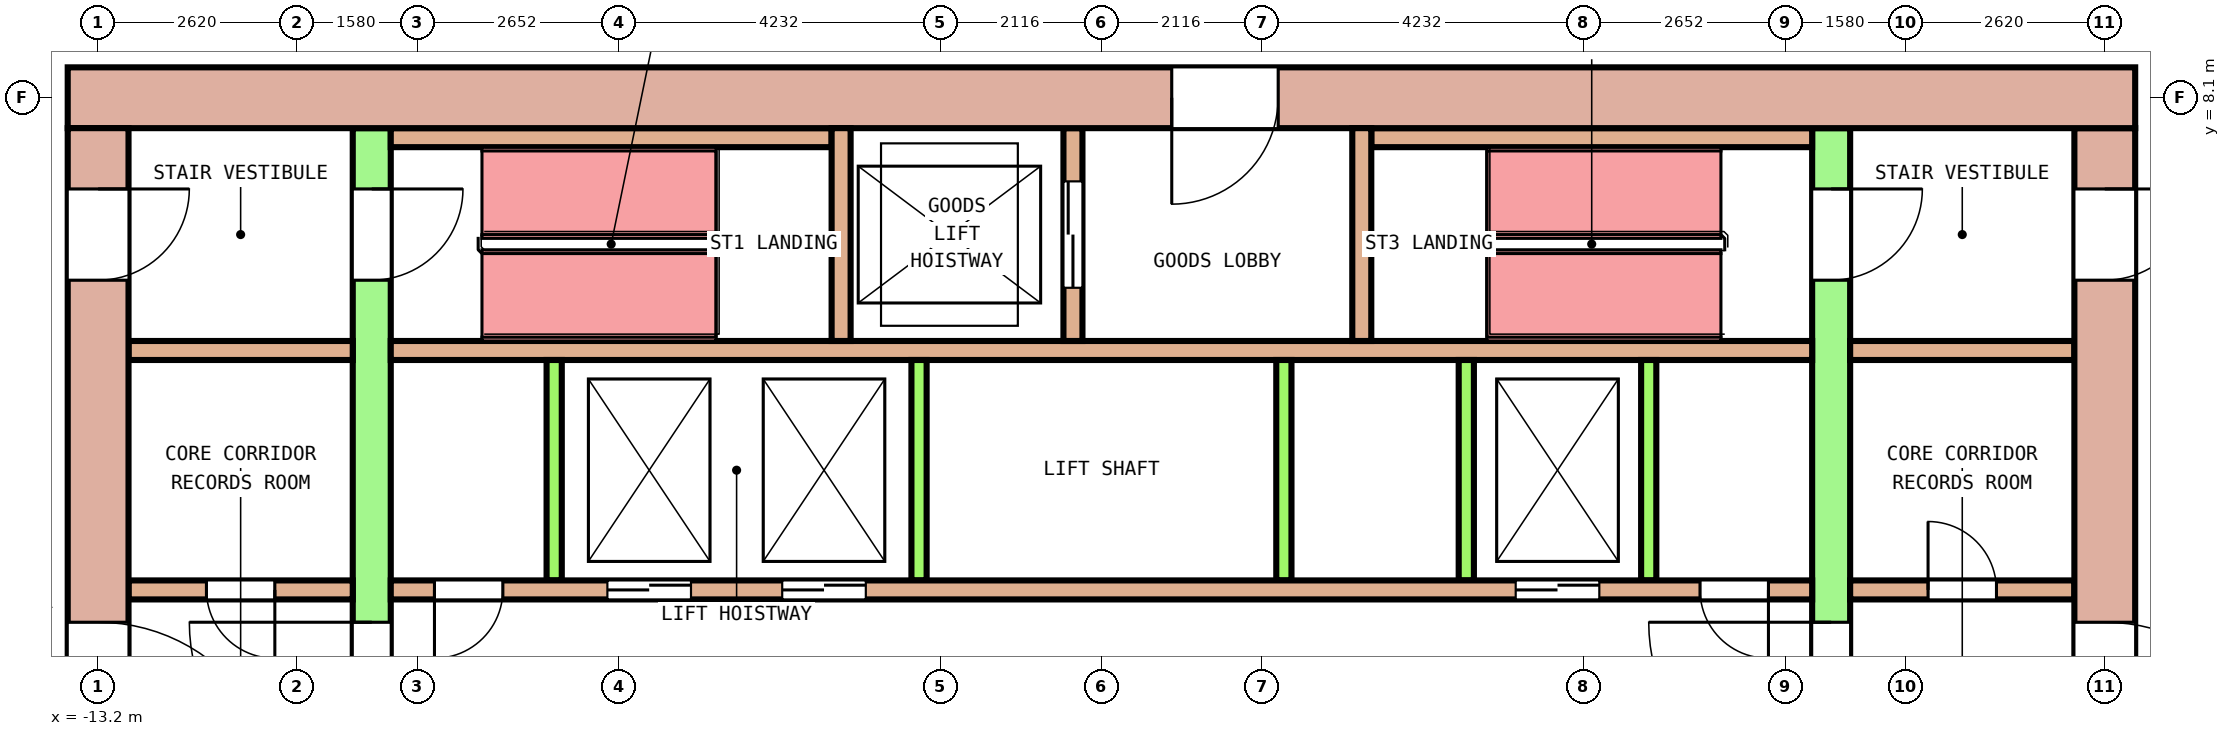
"""IFC4 building model, lengths in metres.
Left out: names, types, materials, properties, quantities, classifications, styles, units other than length and angle.
Written with IfcOpenShell. Run it as: python <this file> out.ifc"""

import sys

from ifc_helpers import new_model, si_unit, direction, frame, frame_2d, origin, place, context, subcontext, project, spatial, rectangle, extrude, element, fill, save


model = new_model("IFC4")
c1 = context("Model", 3, precision=1e-05, world=origin(), true_north=direction((0.0, 1.0)))
c2 = subcontext(c1, "Body", "Model", "MODEL_VIEW")
j1 = project(units=[si_unit("LENGTHUNIT", "METRE"), si_unit("PLANEANGLEUNIT", "RADIAN")], contexts=[c1])
p1 = place(None, origin())
s1 = spatial("IfcSite", under=j1, at=p1, CompositionType="ELEMENT")
p2 = place(p1, origin())
s2 = spatial("IfcBuilding", under=s1, at=p2, CompositionType="ELEMENT")
p3 = place(p2, frame((0.0, 0.0, 135.2)))
s3 = spatial("IfcBuildingStorey", under=s2, at=p3, CompositionType="ELEMENT", Elevation=135.2)
p4 = place(p3, frame((-13.6, 8.1, 0.0), z_axis=(0.0, 0.0, 1.0), x_axis=(1.0, 0.0, 0.0)))
e1 = element("IfcWall", 1, at=p4, inside=s3, PredefinedType="SHEAR", context=c2, shape_type="SweptSolid", body=[
    extrude(rectangle(XDim=27.2, YDim=0.8, at=frame_2d((13.6, 0.0))), origin(), (0.0, 0.0, 1.0), 4.1),
])
p5 = place(p4, frame((14.525, 0.0, 0.0)))
e2 = element("IfcOpeningElement", 2, at=p5, cuts=e1, PredefinedType="OPENING", context=c2, shape_type="SweptSolid", body=[
    extrude(rectangle(XDim=1.4, YDim=2.1, at=frame_2d((0.7, 1.05))), frame((0.0, 0.41, 0.0), z_axis=(0.0, -1.0, 0.0), x_axis=(1.0, 0.0, 0.0)), (0.0, 0.0, 1.0), 0.82),
])
p6 = place(p3, frame((-13.2, -7.7, 0.0), z_axis=(0.0, 0.0, 1.0), x_axis=(0.0, 1.0, 0.0)))
e3 = element("IfcWall", 3, at=p6, inside=s3, PredefinedType="SHEAR", context=c2, shape_type="SweptSolid", body=[
    extrude(rectangle(XDim=15.4, YDim=0.8, at=frame_2d((7.7, 0.0))), origin(), (0.0, 0.0, 1.0), 4.1),
])
p7 = place(p6, frame((6.5, 0.0, 0.0)))
e4 = element("IfcOpeningElement", 4, at=p7, cuts=e3, PredefinedType="OPENING", context=c2, shape_type="SweptSolid", body=[
    extrude(rectangle(XDim=2.4, YDim=2.1, at=frame_2d((1.2, 1.05))), frame((0.0, 0.41, 0.0), z_axis=(0.0, -1.0, 0.0), x_axis=(1.0, 0.0, 0.0)), (0.0, 0.0, 1.0), 0.82),
])
p8 = place(p6, frame((13.4, 0.0, 0.0)))
e5 = element("IfcOpeningElement", 5, at=p8, cuts=e3, PredefinedType="OPENING", context=c2, shape_type="SweptSolid", body=[
    extrude(rectangle(XDim=1.2, YDim=2.1, at=frame_2d((0.6, 1.05))), frame((0.0, 0.41, 0.0), z_axis=(0.0, -1.0, 0.0), x_axis=(1.0, 0.0, 0.0)), (0.0, 0.0, 1.0), 0.82),
])
p9 = place(p6, frame((0.8, 0.0, 0.0)))
e6 = element("IfcOpeningElement", 6, at=p9, cuts=e3, PredefinedType="OPENING", context=c2, shape_type="SweptSolid", body=[
    extrude(rectangle(XDim=1.2, YDim=2.1, at=frame_2d((0.6, 1.05))), frame((0.0, 0.41, 0.0), z_axis=(0.0, -1.0, 0.0), x_axis=(1.0, 0.0, 0.0)), (0.0, 0.0, 1.0), 0.82),
])
p10 = place(p3, frame((13.2, -7.7, 0.0), z_axis=(0.0, 0.0, 1.0), x_axis=(0.0, 1.0, 0.0)))
e7 = element("IfcWall", 7, at=p10, inside=s3, PredefinedType="SHEAR", context=c2, shape_type="SweptSolid", body=[
    extrude(rectangle(XDim=15.4, YDim=0.8, at=frame_2d((7.7, 0.0))), origin(), (0.0, 0.0, 1.0), 4.1),
])
p11 = place(p10, frame((6.5, 0.0, 0.0)))
e8 = element("IfcOpeningElement", 8, at=p11, cuts=e7, PredefinedType="OPENING", context=c2, shape_type="SweptSolid", body=[
    extrude(rectangle(XDim=2.4, YDim=2.1, at=frame_2d((1.2, 1.05))), frame((0.0, 0.41, 0.0), z_axis=(0.0, -1.0, 0.0), x_axis=(1.0, 0.0, 0.0)), (0.0, 0.0, 1.0), 0.82),
])
p12 = place(p10, frame((13.4, 0.0, 0.0)))
e9 = element("IfcOpeningElement", 9, at=p12, cuts=e7, PredefinedType="OPENING", context=c2, shape_type="SweptSolid", body=[
    extrude(rectangle(XDim=1.2, YDim=2.1, at=frame_2d((0.6, 1.05))), frame((0.0, 0.41, 0.0), z_axis=(0.0, -1.0, 0.0), x_axis=(1.0, 0.0, 0.0)), (0.0, 0.0, 1.0), 0.82),
])
p13 = place(p10, frame((0.9, 0.0, 0.0)))
e10 = element("IfcOpeningElement", 10, at=p13, cuts=e7, PredefinedType="OPENING", context=c2, shape_type="SweptSolid", body=[
    extrude(rectangle(XDim=1.0, YDim=2.1, at=frame_2d((0.5, 1.05))), frame((0.0, 0.41, 0.0), z_axis=(0.0, -1.0, 0.0), x_axis=(1.0, 0.0, 0.0)), (0.0, 0.0, 1.0), 0.82),
])
p14 = place(p3, frame((-9.6, -7.7, 0.0), z_axis=(0.0, 0.0, 1.0), x_axis=(0.0, 1.0, 0.0)))
e11 = element("IfcWall", 11, at=p14, inside=s3, PredefinedType="SHEAR", context=c2, shape_type="SweptSolid", body=[
    extrude(rectangle(XDim=15.4, YDim=0.5, at=frame_2d((7.7, 0.0))), origin(), (0.0, 0.0, 1.0), 4.1),
])
p15 = place(p14, frame((6.5, 0.0, 0.0)))
e12 = element("IfcOpeningElement", 12, at=p15, cuts=e11, PredefinedType="OPENING", context=c2, shape_type="SweptSolid", body=[
    extrude(rectangle(XDim=2.4, YDim=2.1, at=frame_2d((1.2, 1.05))), frame((0.0, 0.26, 0.0), z_axis=(0.0, -1.0, 0.0), x_axis=(1.0, 0.0, 0.0)), (0.0, 0.0, 1.0), 0.52),
])
p16 = place(p14, frame((13.4, 0.0, 0.0)))
e13 = element("IfcOpeningElement", 13, at=p16, cuts=e11, PredefinedType="OPENING", context=c2, shape_type="SweptSolid", body=[
    extrude(rectangle(XDim=1.2, YDim=2.1, at=frame_2d((0.6, 1.05))), frame((0.0, 0.26, 0.0), z_axis=(0.0, -1.0, 0.0), x_axis=(1.0, 0.0, 0.0)), (0.0, 0.0, 1.0), 0.52),
])
p17 = place(p14, frame((0.8, 0.0, 0.0)))
e14 = element("IfcOpeningElement", 14, at=p17, cuts=e11, PredefinedType="OPENING", context=c2, shape_type="SweptSolid", body=[
    extrude(rectangle(XDim=1.2, YDim=2.1, at=frame_2d((0.6, 1.05))), frame((0.0, 0.26, 0.0), z_axis=(0.0, -1.0, 0.0), x_axis=(1.0, 0.0, 0.0)), (0.0, 0.0, 1.0), 0.52),
])
p18 = place(p3, frame((9.6, -7.7, 0.0), z_axis=(0.0, 0.0, 1.0), x_axis=(0.0, 1.0, 0.0)))
e15 = element("IfcWall", 15, at=p18, inside=s3, PredefinedType="SHEAR", context=c2, shape_type="SweptSolid", body=[
    extrude(rectangle(XDim=15.4, YDim=0.5, at=frame_2d((7.7, 0.0))), origin(), (0.0, 0.0, 1.0), 4.1),
])
p19 = place(p18, frame((6.5, 0.0, 0.0)))
e16 = element("IfcOpeningElement", 16, at=p19, cuts=e15, PredefinedType="OPENING", context=c2, shape_type="SweptSolid", body=[
    extrude(rectangle(XDim=2.4, YDim=2.1, at=frame_2d((1.2, 1.05))), frame((0.0, 0.26, 0.0), z_axis=(0.0, -1.0, 0.0), x_axis=(1.0, 0.0, 0.0)), (0.0, 0.0, 1.0), 0.52),
])
p20 = place(p18, frame((13.4, 0.0, 0.0)))
e17 = element("IfcOpeningElement", 17, at=p20, cuts=e15, PredefinedType="OPENING", context=c2, shape_type="SweptSolid", body=[
    extrude(rectangle(XDim=1.2, YDim=2.1, at=frame_2d((0.6, 1.05))), frame((0.0, 0.26, 0.0), z_axis=(0.0, -1.0, 0.0), x_axis=(1.0, 0.0, 0.0)), (0.0, 0.0, 1.0), 0.52),
])
p21 = place(p18, frame((0.9, 0.0, 0.0)))
e18 = element("IfcOpeningElement", 18, at=p21, cuts=e15, PredefinedType="OPENING", context=c2, shape_type="SweptSolid", body=[
    extrude(rectangle(XDim=1.0, YDim=2.1, at=frame_2d((0.5, 1.05))), frame((0.0, 0.26, 0.0), z_axis=(0.0, -1.0, 0.0), x_axis=(1.0, 0.0, 0.0)), (0.0, 0.0, 1.0), 0.52),
])
p22 = place(p3, frame((-12.8, 1.625, 0.0), z_axis=(0.0, 0.0, 1.0), x_axis=(1.0, 0.0, 0.0)))
e19 = element("IfcWall", 19, at=p22, inside=s3, PredefinedType="SOLIDWALL", context=c2, shape_type="SweptSolid", body=[
    extrude(rectangle(XDim=2.95, YDim=0.25, at=frame_2d((1.475, 0.0))), origin(), (0.0, 0.0, 1.0), 4.1),
])
p23 = place(p22, frame((1.025, 0.0, 0.0)))
e20 = element("IfcOpeningElement", 20, at=p23, cuts=e19, PredefinedType="OPENING", context=c2, shape_type="SweptSolid", body=[
    extrude(rectangle(XDim=0.9, YDim=2.1, at=frame_2d((0.45, 1.05))), frame((0.0, 0.135, 0.0), z_axis=(0.0, -1.0, 0.0), x_axis=(1.0, 0.0, 0.0)), (0.0, 0.0, 1.0), 0.27),
])
p24 = place(p3, frame((-9.35, 1.625, 0.0), z_axis=(0.0, 0.0, 1.0), x_axis=(1.0, 0.0, 0.0)))
e21 = element("IfcWall", 21, at=p24, inside=s3, PredefinedType="SOLIDWALL", context=c2, shape_type="SweptSolid", body=[
    extrude(rectangle(XDim=18.7, YDim=0.25, at=frame_2d((9.35, 0.0))), origin(), (0.0, 0.0, 1.0), 4.1),
])
p25 = place(p24, frame((2.85, 0.0, 0.0)))
e22 = element("IfcOpeningElement", 22, at=p25, cuts=e21, PredefinedType="OPENING", context=c2, shape_type="SweptSolid", body=[
    extrude(rectangle(XDim=1.1, YDim=2.1, at=frame_2d((0.55, 1.05))), frame((0.0, 0.135, 0.0), z_axis=(0.0, -1.0, 0.0), x_axis=(1.0, 0.0, 0.0)), (0.0, 0.0, 1.0), 0.27),
])
p26 = place(p24, frame((5.15, 0.0, 0.0)))
e23 = element("IfcOpeningElement", 23, at=p26, cuts=e21, PredefinedType="OPENING", context=c2, shape_type="SweptSolid", body=[
    extrude(rectangle(XDim=1.1, YDim=2.1, at=frame_2d((0.55, 1.05))), frame((0.0, 0.135, 0.0), z_axis=(0.0, -1.0, 0.0), x_axis=(1.0, 0.0, 0.0)), (0.0, 0.0, 1.0), 0.27),
])
p27 = place(p24, frame((14.8, 0.0, 0.0)))
e24 = element("IfcOpeningElement", 24, at=p27, cuts=e21, PredefinedType="OPENING", context=c2, shape_type="SweptSolid", body=[
    extrude(rectangle(XDim=1.1, YDim=2.1, at=frame_2d((0.55, 1.05))), frame((0.0, 0.135, 0.0), z_axis=(0.0, -1.0, 0.0), x_axis=(1.0, 0.0, 0.0)), (0.0, 0.0, 1.0), 0.27),
])
p28 = place(p24, frame((0.575, 0.0, 0.0)))
e25 = element("IfcOpeningElement", 25, at=p28, cuts=e21, PredefinedType="OPENING", context=c2, shape_type="SweptSolid", body=[
    extrude(rectangle(XDim=0.9, YDim=2.1, at=frame_2d((0.45, 1.05))), frame((0.0, 0.135, 0.0), z_axis=(0.0, -1.0, 0.0), x_axis=(1.0, 0.0, 0.0)), (0.0, 0.0, 1.0), 0.27),
])
p29 = place(p24, frame((17.225, 0.0, 0.0)))
e26 = element("IfcOpeningElement", 26, at=p29, cuts=e21, PredefinedType="OPENING", context=c2, shape_type="SweptSolid", body=[
    extrude(rectangle(XDim=0.9, YDim=2.1, at=frame_2d((0.45, 1.05))), frame((0.0, 0.135, 0.0), z_axis=(0.0, -1.0, 0.0), x_axis=(1.0, 0.0, 0.0)), (0.0, 0.0, 1.0), 0.27),
])
p30 = place(p3, frame((9.85, 1.625, 0.0), z_axis=(0.0, 0.0, 1.0), x_axis=(1.0, 0.0, 0.0)))
e27 = element("IfcWall", 27, at=p30, inside=s3, PredefinedType="SOLIDWALL", context=c2, shape_type="SweptSolid", body=[
    extrude(rectangle(XDim=2.95, YDim=0.25, at=frame_2d((1.475, 0.0))), origin(), (0.0, 0.0, 1.0), 4.1),
])
p31 = place(p30, frame((1.025, 0.0, 0.0)))
e28 = element("IfcOpeningElement", 28, at=p31, cuts=e27, PredefinedType="OPENING", context=c2, shape_type="SweptSolid", body=[
    extrude(rectangle(XDim=0.9, YDim=2.1, at=frame_2d((0.45, 1.05))), frame((0.0, 0.135, 0.0), z_axis=(0.0, -1.0, 0.0), x_axis=(1.0, 0.0, 0.0)), (0.0, 0.0, 1.0), 0.27),
])
p32 = place(p3, frame((-12.8, 4.775, 0.0), z_axis=(0.0, 0.0, 1.0), x_axis=(1.0, 0.0, 0.0)))
e29 = element("IfcWall", 29, at=p32, inside=s3, PredefinedType="SOLIDWALL", context=c2, shape_type="SweptSolid", body=[
    extrude(rectangle(XDim=2.95, YDim=0.25, at=frame_2d((1.475, 0.0))), origin(), (0.0, 0.0, 1.0), 4.1),
])
p33 = place(p3, frame((-9.35, 4.775, 0.0), z_axis=(0.0, 0.0, 1.0), x_axis=(1.0, 0.0, 0.0)))
e30 = element("IfcWall", 30, at=p33, inside=s3, PredefinedType="SOLIDWALL", context=c2, shape_type="SweptSolid", body=[
    extrude(rectangle(XDim=18.7, YDim=0.25, at=frame_2d((9.35, 0.0))), origin(), (0.0, 0.0, 1.0), 4.1),
])
p34 = place(p3, frame((9.85, 4.775, 0.0), z_axis=(0.0, 0.0, 1.0), x_axis=(1.0, 0.0, 0.0)))
e31 = element("IfcWall", 31, at=p34, inside=s3, PredefinedType="SOLIDWALL", context=c2, shape_type="SweptSolid", body=[
    extrude(rectangle(XDim=2.95, YDim=0.25, at=frame_2d((1.475, 0.0))), origin(), (0.0, 0.0, 1.0), 4.1),
])
for number, where, z_axis, x_axis in (
    (32, (-7.2, 1.75, 0.0), (0.0, 0.0, 1.0), (0.0, 1.0, 0.0)),
    (33, (-2.4, 1.75, 0.0), (0.0, 0.0, 1.0), (0.0, 1.0, 0.0)),
    (34, (2.4, 1.75, 0.0), (0.0, 0.0, 1.0), (0.0, 1.0, 0.0)),
    (35, (4.8, 1.75, 0.0), (0.0, 0.0, 1.0), (0.0, 1.0, 0.0)),
    (36, (7.2, 1.75, 0.0), (0.0, 0.0, 1.0), (0.0, 1.0, 0.0)),
):
    element("IfcWall", number, at=place(p3, frame(where, z_axis=z_axis, x_axis=x_axis)), inside=s3, PredefinedType="SOLIDWALL", context=c2, shape_type="SweptSolid", body=[
        extrude(rectangle(XDim=2.9, YDim=0.2, at=frame_2d((1.45, 0.0))), origin(), (0.0, 0.0, 1.0), 4.1),
    ])
for number, where, z_axis, x_axis in (
    (37, (-9.35, 7.575, 0.0), (0.0, 0.0, 1.0), (1.0, 0.0, 0.0)),
    (38, (3.55, 7.575, 0.0), (0.0, 0.0, 1.0), (1.0, 0.0, 0.0)),
):
    element("IfcWall", number, at=place(p3, frame(where, z_axis=z_axis, x_axis=x_axis)), inside=s3, PredefinedType="SOLIDWALL", context=c2, shape_type="SweptSolid", body=[
        extrude(rectangle(XDim=5.8, YDim=0.25, at=frame_2d((2.9, 0.0))), origin(), (0.0, 0.0, 1.0), 4.1),
    ])
p35 = place(p3, frame((-3.425, 4.9, 0.0), z_axis=(0.0, 0.0, 1.0), x_axis=(0.0, 1.0, 0.0)))
e39 = element("IfcWall", 39, at=p35, inside=s3, PredefinedType="SOLIDWALL", context=c2, shape_type="SweptSolid", body=[
    extrude(rectangle(XDim=2.8, YDim=0.25, at=frame_2d((1.4, 0.0))), origin(), (0.0, 0.0, 1.0), 4.1),
])
p36 = place(p3, frame((-0.375, 4.9, 0.0), z_axis=(0.0, 0.0, 1.0), x_axis=(0.0, 1.0, 0.0)))
e40 = element("IfcWall", 40, at=p36, inside=s3, PredefinedType="SOLIDWALL", context=c2, shape_type="SweptSolid", body=[
    extrude(rectangle(XDim=2.8, YDim=0.25, at=frame_2d((1.4, 0.0))), origin(), (0.0, 0.0, 1.0), 4.1),
])
p37 = place(p36, frame((0.7, 0.0, 0.0)))
e41 = element("IfcOpeningElement", 41, at=p37, cuts=e40, PredefinedType="OPENING", context=c2, shape_type="SweptSolid", body=[
    extrude(rectangle(XDim=1.4, YDim=2.1, at=frame_2d((0.7, 1.05))), frame((0.0, 0.135, 0.0), z_axis=(0.0, -1.0, 0.0), x_axis=(1.0, 0.0, 0.0)), (0.0, 0.0, 1.0), 0.27),
])
p38 = place(p3, frame((3.425, 4.9, 0.0), z_axis=(0.0, 0.0, 1.0), x_axis=(0.0, 1.0, 0.0)))
e42 = element("IfcWall", 42, at=p38, inside=s3, PredefinedType="SOLIDWALL", context=c2, shape_type="SweptSolid", body=[
    extrude(rectangle(XDim=2.8, YDim=0.25, at=frame_2d((1.4, 0.0))), origin(), (0.0, 0.0, 1.0), 4.1),
])
p39 = place(p25, origin())
e43 = element("IfcDoor", 43, at=p39, inside=s3, OperationType="DOUBLE_DOOR_SLIDING", PredefinedType="DOOR", context=c2, shape_type="SweptSolid", body=[
    extrude(rectangle(XDim=1.1, YDim=2.1, at=frame_2d((0.55, 1.05))), frame((0.0, 0.075, 0.0), z_axis=(0.0, -1.0, 0.0), x_axis=(1.0, 0.0, 0.0)), (0.0, 0.0, 1.0), 0.15),
])
fill(e22, e43)
p40 = place(p26, origin())
e44 = element("IfcDoor", 44, at=p40, inside=s3, OperationType="DOUBLE_DOOR_SLIDING", PredefinedType="DOOR", context=c2, shape_type="SweptSolid", body=[
    extrude(rectangle(XDim=1.1, YDim=2.1, at=frame_2d((0.55, 1.05))), frame((0.0, 0.075, 0.0), z_axis=(0.0, -1.0, 0.0), x_axis=(1.0, 0.0, 0.0)), (0.0, 0.0, 1.0), 0.15),
])
fill(e23, e44)
p41 = place(p27, origin())
e45 = element("IfcDoor", 45, at=p41, inside=s3, OperationType="DOUBLE_DOOR_SLIDING", PredefinedType="DOOR", context=c2, shape_type="SweptSolid", body=[
    extrude(rectangle(XDim=1.1, YDim=2.1, at=frame_2d((0.55, 1.05))), frame((0.0, 0.075, 0.0), z_axis=(0.0, -1.0, 0.0), x_axis=(1.0, 0.0, 0.0)), (0.0, 0.0, 1.0), 0.15),
])
fill(e24, e45)
p42 = place(p37, origin())
e46 = element("IfcDoor", 46, at=p42, inside=s3, OperationType="DOUBLE_DOOR_SLIDING", PredefinedType="DOOR", context=c2, shape_type="SweptSolid", body=[
    extrude(rectangle(XDim=1.4, YDim=2.1, at=frame_2d((0.7, 1.05))), frame((0.0, 0.075, 0.0), z_axis=(0.0, -1.0, 0.0), x_axis=(1.0, 0.0, 0.0)), (0.0, 0.0, 1.0), 0.15),
])
fill(e41, e46)
p43 = place(p15, origin())
e47 = element("IfcDoor", 47, at=p43, inside=s3, OperationType="DOUBLE_DOOR_SINGLE_SWING", PredefinedType="DOOR", context=c2, shape_type="SweptSolid", body=[
    extrude(rectangle(XDim=2.4, YDim=2.1, at=frame_2d((1.2, 1.05))), frame((0.0, 0.2, 0.0), z_axis=(0.0, -1.0, 0.0), x_axis=(1.0, 0.0, 0.0)), (0.0, 0.0, 1.0), 0.4),
])
fill(e12, e47)
p44 = place(p19, origin())
e48 = element("IfcDoor", 48, at=p44, inside=s3, OperationType="DOUBLE_DOOR_SINGLE_SWING", PredefinedType="DOOR", context=c2, shape_type="SweptSolid", body=[
    extrude(rectangle(XDim=2.4, YDim=2.1, at=frame_2d((1.2, 1.05))), frame((0.0, 0.2, 0.0), z_axis=(0.0, -1.0, 0.0), x_axis=(1.0, 0.0, 0.0)), (0.0, 0.0, 1.0), 0.4),
])
fill(e16, e48)
p45 = place(p7, origin())
e49 = element("IfcDoor", 49, at=p45, inside=s3, OperationType="DOUBLE_DOOR_SINGLE_SWING", PredefinedType="DOOR", context=c2, shape_type="SweptSolid", body=[
    extrude(rectangle(XDim=2.4, YDim=2.1, at=frame_2d((1.2, 1.05))), frame((0.0, 0.3, 0.0), z_axis=(0.0, -1.0, 0.0), x_axis=(1.0, 0.0, 0.0)), (0.0, 0.0, 1.0), 0.6),
])
fill(e4, e49)
p46 = place(p11, origin())
e50 = element("IfcDoor", 50, at=p46, inside=s3, OperationType="DOUBLE_DOOR_SINGLE_SWING", PredefinedType="DOOR", context=c2, shape_type="SweptSolid", body=[
    extrude(rectangle(XDim=2.4, YDim=2.1, at=frame_2d((1.2, 1.05))), frame((0.0, 0.3, 0.0), z_axis=(0.0, -1.0, 0.0), x_axis=(1.0, 0.0, 0.0)), (0.0, 0.0, 1.0), 0.6),
])
fill(e8, e50)
p47 = place(p16, origin())
e51 = element("IfcDoor", 51, at=p47, inside=s3, OperationType="SINGLE_SWING_RIGHT", PredefinedType="DOOR", context=c2, shape_type="SweptSolid", body=[
    extrude(rectangle(XDim=1.2, YDim=2.1, at=frame_2d((0.6, 1.05))), frame((0.0, 0.2, 0.0), z_axis=(0.0, -1.0, 0.0), x_axis=(1.0, 0.0, 0.0)), (0.0, 0.0, 1.0), 0.4),
])
fill(e13, e51)
p48 = place(p8, origin())
e52 = element("IfcDoor", 52, at=p48, inside=s3, OperationType="SINGLE_SWING_LEFT", PredefinedType="DOOR", context=c2, shape_type="SweptSolid", body=[
    extrude(rectangle(XDim=1.2, YDim=2.1, at=frame_2d((0.6, 1.05))), frame((0.0, 0.3, 0.0), z_axis=(0.0, -1.0, 0.0), x_axis=(1.0, 0.0, 0.0)), (0.0, 0.0, 1.0), 0.6),
])
fill(e5, e52)
p49 = place(p20, origin())
e53 = element("IfcDoor", 53, at=p49, inside=s3, OperationType="SINGLE_SWING_RIGHT", PredefinedType="DOOR", context=c2, shape_type="SweptSolid", body=[
    extrude(rectangle(XDim=1.2, YDim=2.1, at=frame_2d((0.6, 1.05))), frame((0.0, 0.2, 0.0), z_axis=(0.0, -1.0, 0.0), x_axis=(1.0, 0.0, 0.0)), (0.0, 0.0, 1.0), 0.4),
])
fill(e17, e53)
p50 = place(p12, origin())
e54 = element("IfcDoor", 54, at=p50, inside=s3, OperationType="SINGLE_SWING_LEFT", PredefinedType="DOOR", context=c2, shape_type="SweptSolid", body=[
    extrude(rectangle(XDim=1.2, YDim=2.1, at=frame_2d((0.6, 1.05))), frame((0.0, 0.3, 0.0), z_axis=(0.0, -1.0, 0.0), x_axis=(1.0, 0.0, 0.0)), (0.0, 0.0, 1.0), 0.6),
])
fill(e9, e54)
p51 = place(p5, origin())
e55 = element("IfcDoor", 55, at=p51, inside=s3, OperationType="DOUBLE_DOOR_SINGLE_SWING", PredefinedType="DOOR", context=c2, shape_type="SweptSolid", body=[
    extrude(rectangle(XDim=1.4, YDim=2.1, at=frame_2d((0.7, 1.05))), frame((0.0, 0.3, 0.0), z_axis=(0.0, -1.0, 0.0), x_axis=(1.0, 0.0, 0.0)), (0.0, 0.0, 1.0), 0.6),
])
fill(e2, e55)
p52 = place(p23, origin())
e56 = element("IfcDoor", 56, at=p52, inside=s3, OperationType="SINGLE_SWING_RIGHT", PredefinedType="DOOR", context=c2, shape_type="SweptSolid", body=[
    extrude(rectangle(XDim=0.9, YDim=2.1, at=frame_2d((0.45, 1.05))), frame((0.0, 0.075, 0.0), z_axis=(0.0, -1.0, 0.0), x_axis=(1.0, 0.0, 0.0)), (0.0, 0.0, 1.0), 0.15),
])
fill(e20, e56)
p53 = place(p28, origin())
e57 = element("IfcDoor", 57, at=p53, inside=s3, OperationType="SINGLE_SWING_LEFT", PredefinedType="DOOR", context=c2, shape_type="SweptSolid", body=[
    extrude(rectangle(XDim=0.9, YDim=2.1, at=frame_2d((0.45, 1.05))), frame((0.0, 0.075, 0.0), z_axis=(0.0, -1.0, 0.0), x_axis=(1.0, 0.0, 0.0)), (0.0, 0.0, 1.0), 0.15),
])
fill(e25, e57)
p54 = place(p29, origin())
e58 = element("IfcDoor", 58, at=p54, inside=s3, OperationType="SINGLE_SWING_RIGHT", PredefinedType="DOOR", context=c2, shape_type="SweptSolid", body=[
    extrude(rectangle(XDim=0.9, YDim=2.1, at=frame_2d((0.45, 1.05))), frame((0.0, 0.075, 0.0), z_axis=(0.0, -1.0, 0.0), x_axis=(1.0, 0.0, 0.0)), (0.0, 0.0, 1.0), 0.15),
])
fill(e26, e58)
p55 = place(p31, origin())
e59 = element("IfcDoor", 59, at=p55, inside=s3, OperationType="SINGLE_SWING_LEFT", PredefinedType="DOOR", context=c2, shape_type="SweptSolid", body=[
    extrude(rectangle(XDim=0.9, YDim=2.1, at=frame_2d((0.45, 1.05))), frame((0.0, 0.075, 0.0), z_axis=(0.0, -1.0, 0.0), x_axis=(1.0, 0.0, 0.0)), (0.0, 0.0, 1.0), 0.15),
])
fill(e28, e59)
save(model, sys.argv[1])
